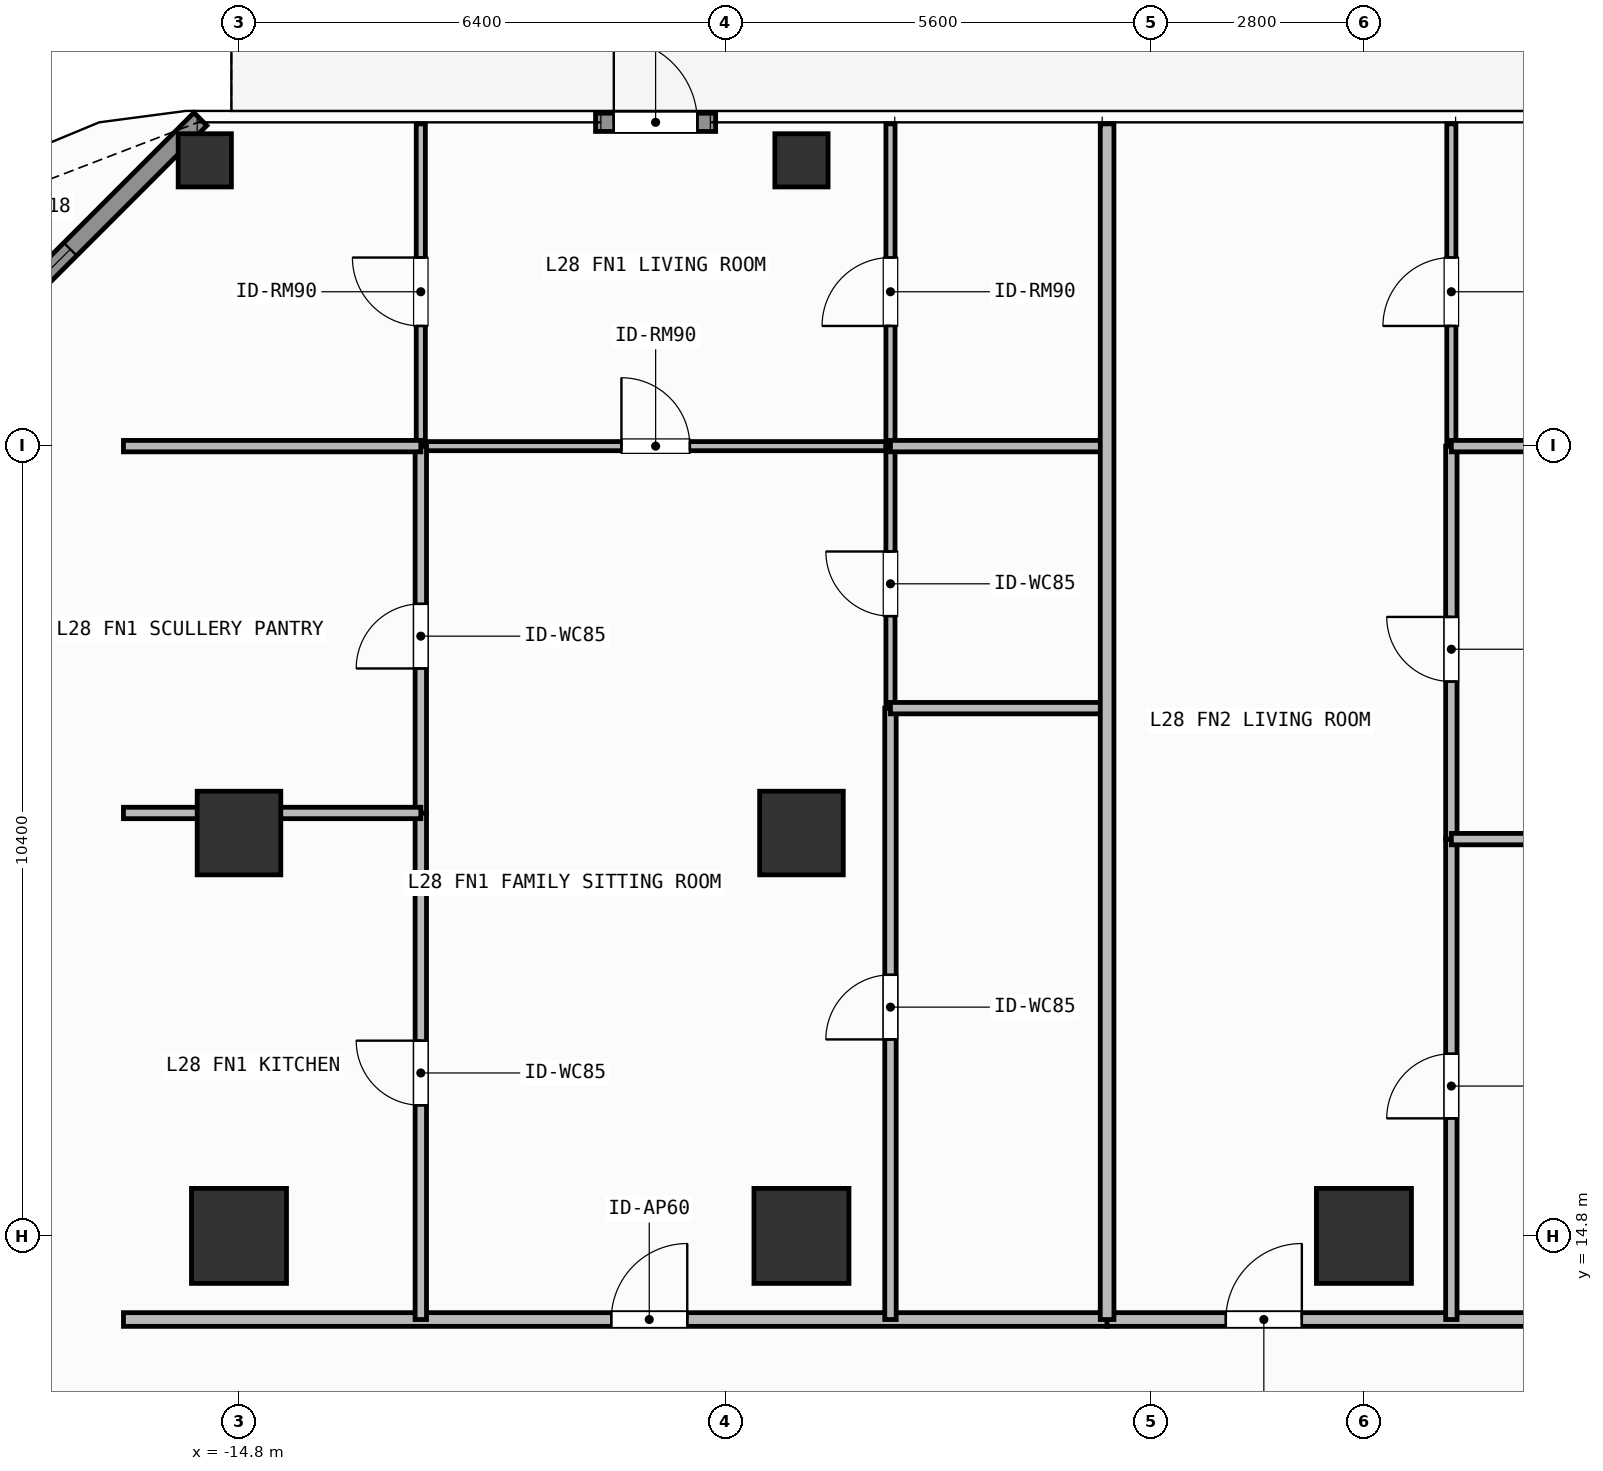
"""IFC4 building model, lengths in metres.
Left out: names, types, materials, properties, quantities, classifications, styles, units other than length and angle.
Written with IfcOpenShell. Run it as: python <this file> out.ifc"""

import sys

from ifc_helpers import new_model, si_unit, direction, frame, frame_2d, origin, origin_2d, place, context, subcontext, project, spatial, rectangle, hollow_rectangle, extrude, element, fill, save


model = new_model("IFC4")
c1 = context("Model", 3, precision=1e-05, world=origin(), true_north=direction((0.0, 1.0)))
c2 = subcontext(c1, "Body", "Model", "MODEL_VIEW")
j1 = project(units=[si_unit("LENGTHUNIT", "METRE"), si_unit("PLANEANGLEUNIT", "RADIAN")], contexts=[c1])
p1 = place(None, origin())
s1 = spatial("IfcSite", under=j1, at=p1, CompositionType="ELEMENT")
p2 = place(p1, origin())
s2 = spatial("IfcBuilding", under=s1, at=p2, CompositionType="ELEMENT")
p3 = place(p2, frame((0.0, 0.0, 113.4)))
s3 = spatial("IfcBuildingStorey", under=s2, at=p3, CompositionType="ELEMENT", Elevation=113.4)
for number, where, z_axis, x_axis in (
    (1, (-14.8, 14.8, 0.0), (0.0, 0.0, 1.0), (1.0, 0.0, 0.0)),
    (2, (-7.4, 14.8, 0.0), (0.0, 0.0, 1.0), (1.0, 0.0, 0.0)),
    (3, (0.0, 14.8, 0.0), (0.0, 0.0, 1.0), (1.0, 0.0, 0.0)),
):
    element("IfcColumn", number, at=place(p3, frame(where, z_axis=z_axis, x_axis=x_axis)), inside=s3, PredefinedType="COLUMN", context=c2, shape_type="SweptSolid", body=[
        extrude(rectangle(XDim=1.25, YDim=1.25, at=origin_2d()), origin(), (0.0, 0.0, 1.0), 3.9),
    ])
for number, where, z_axis, x_axis in (
    (4, (-14.8, 20.1, 0.0), (0.0, 0.0, 1.0), (1.0, 0.0, 0.0)),
    (5, (-7.4, 20.1, 0.0), (0.0, 0.0, 1.0), (1.0, 0.0, 0.0)),
):
    element("IfcColumn", number, at=place(p3, frame(where, z_axis=z_axis, x_axis=x_axis)), inside=s3, PredefinedType="COLUMN", context=c2, shape_type="SweptSolid", body=[
        extrude(rectangle(XDim=1.1, YDim=1.1, at=origin_2d()), origin(), (0.0, 0.0, 1.0), 3.9),
    ])
for number, where, z_axis, x_axis in (
    (6, (-15.25, 28.95, 0.0), (0.0, 0.0, 1.0), (1.0, 0.0, 0.0)),
    (7, (-7.4, 28.95, 0.0), (0.0, 0.0, 1.0), (1.0, 0.0, 0.0)),
):
    element("IfcColumn", number, at=place(p3, frame(where, z_axis=z_axis, x_axis=x_axis)), inside=s3, PredefinedType="COLUMN", context=c2, shape_type="SweptSolid", body=[
        extrude(hollow_rectangle(XDim=0.7, YDim=0.7, WallThickness=0.032, at=origin_2d()), origin(), (0.0, 0.0, 1.0), 3.9),
    ])
p4 = place(p3, frame((-10.109, 29.45, 0.0), z_axis=(0.0, 0.0, 1.0), x_axis=(1.0, 0.0, 0.0)))
e8 = element("IfcWall", 8, at=p4, inside=s3, PredefinedType="SOLIDWALL", context=c2, shape_type="SweptSolid", body=[
    extrude(rectangle(XDim=1.58, YDim=0.24, at=frame_2d((0.79, 0.0))), origin(), (0.0, 0.0, 1.0), 3.68),
])
p5 = place(p4, frame((0.24, 0.0, 0.0)))
e9 = element("IfcOpeningElement", 9, at=p5, cuts=e8, PredefinedType="OPENING", context=c2, shape_type="SweptSolid", body=[
    extrude(rectangle(XDim=1.1, YDim=2.2, at=frame_2d((0.55, 1.1))), frame((0.0, 0.13, 0.0), z_axis=(0.0, -1.0, 0.0), x_axis=(1.0, 0.0, 0.0)), (0.0, 0.0, 1.0), 0.26),
])
p6 = place(p3, frame((-19.792, 25.008, 0.0), z_axis=(0.0, 0.0, 1.0), x_axis=(0.707106781187, 0.707106781187, 0.0)))
e10 = element("IfcWall", 10, at=p6, inside=s3, PredefinedType="SOLIDWALL", context=c2, shape_type="SweptSolid", body=[
    extrude(rectangle(XDim=6.343, YDim=0.24, at=frame_2d((3.171, 0.0))), origin(), (0.0, 0.0, 1.0), 3.68),
])
p7 = place(p6, frame((2.421, 0.0, 0.8)))
e11 = element("IfcOpeningElement", 11, at=p7, cuts=e10, PredefinedType="OPENING", context=c2, shape_type="SweptSolid", body=[
    extrude(rectangle(XDim=1.5, YDim=1.85, at=frame_2d((0.75, 0.925))), frame((0.0, 0.13, 0.0), z_axis=(0.0, -1.0, 0.0), x_axis=(1.0, 0.0, 0.0)), (0.0, 0.0, 1.0), 0.26),
])
p8 = place(p3, frame((-16.32, 13.7, 0.0), z_axis=(0.0, 0.0, 1.0), x_axis=(1.0, 0.0, 0.0)))
e12 = element("IfcWall", 12, at=p8, inside=s3, PredefinedType="PARTITIONING", context=c2, shape_type="SweptSolid", body=[
    extrude(rectangle(XDim=12.941, YDim=0.18, at=frame_2d((6.471, 0.0))), origin(), (0.0, 0.0, 1.0), 3.68),
])
p9 = place(p8, frame((6.417, 0.0, 0.0)))
e13 = element("IfcOpeningElement", 13, at=p9, cuts=e12, PredefinedType="OPENING", context=c2, shape_type="SweptSolid", body=[
    extrude(rectangle(XDim=1.0, YDim=2.2, at=frame_2d((0.5, 1.1))), frame((0.0, 0.1, 0.0), z_axis=(0.0, -1.0, 0.0), x_axis=(1.0, 0.0, 0.0)), (0.0, 0.0, 1.0), 0.2),
])
p10 = place(p3, frame((-12.408, 25.19, 0.0), z_axis=(0.0, 0.0, 1.0), x_axis=(1.0, 0.0, 0.0)))
e14 = element("IfcWall", 14, at=p10, inside=s3, PredefinedType="PARTITIONING", context=c2, shape_type="SweptSolid", body=[
    extrude(rectangle(XDim=6.179, YDim=0.12, at=frame_2d((3.089, 0.0))), origin(), (0.0, 0.0, 1.0), 3.68),
])
p11 = place(p10, frame((2.639, 0.0, 0.0)))
e15 = element("IfcOpeningElement", 15, at=p11, cuts=e14, PredefinedType="OPENING", context=c2, shape_type="SweptSolid", body=[
    extrude(rectangle(XDim=0.9, YDim=2.1, at=frame_2d((0.45, 1.05))), frame((0.0, 0.07, 0.0), z_axis=(0.0, -1.0, 0.0), x_axis=(1.0, 0.0, 0.0)), (0.0, 0.0, 1.0), 0.14),
])
p12 = place(p3, frame((-12.408, 13.7, 0.0), z_axis=(0.0, 0.0, 1.0), x_axis=(0.0, 1.0, 0.0)))
e16 = element("IfcWall", 16, at=p12, inside=s3, PredefinedType="PARTITIONING", context=c2, shape_type="SweptSolid", body=[
    extrude(rectangle(XDim=6.664, YDim=0.15, at=frame_2d((3.332, 0.0))), origin(), (0.0, 0.0, 1.0), 3.68),
])
p13 = place(p12, frame((2.818, 0.0, 0.0)))
e17 = element("IfcOpeningElement", 17, at=p13, cuts=e16, PredefinedType="OPENING", context=c2, shape_type="SweptSolid", body=[
    extrude(rectangle(XDim=0.85, YDim=2.1, at=frame_2d((0.425, 1.05))), frame((0.0, 0.085, 0.0), z_axis=(0.0, -1.0, 0.0), x_axis=(1.0, 0.0, 0.0)), (0.0, 0.0, 1.0), 0.17),
])
p14 = place(p3, frame((-12.408, 20.364, 0.0), z_axis=(0.0, 0.0, 1.0), x_axis=(0.0, 1.0, 0.0)))
e18 = element("IfcWall", 18, at=p14, inside=s3, PredefinedType="PARTITIONING", context=c2, shape_type="SweptSolid", body=[
    extrude(rectangle(XDim=4.826, YDim=0.15, at=frame_2d((2.413, 0.0))), origin(), (0.0, 0.0, 1.0), 3.68),
])
p15 = place(p14, frame((1.901, 0.0, 0.0)))
e19 = element("IfcOpeningElement", 19, at=p15, cuts=e18, PredefinedType="OPENING", context=c2, shape_type="SweptSolid", body=[
    extrude(rectangle(XDim=0.85, YDim=2.1, at=frame_2d((0.425, 1.05))), frame((0.0, 0.085, 0.0), z_axis=(0.0, -1.0, 0.0), x_axis=(1.0, 0.0, 0.0)), (0.0, 0.0, 1.0), 0.17),
])
p16 = place(p3, frame((-12.408, 25.19, 0.0), z_axis=(0.0, 0.0, 1.0), x_axis=(0.0, 1.0, 0.0)))
e20 = element("IfcWall", 20, at=p16, inside=s3, PredefinedType="PARTITIONING", context=c2, shape_type="SweptSolid", body=[
    extrude(rectangle(XDim=4.24, YDim=0.12, at=frame_2d((2.12, 0.0))), origin(), (0.0, 0.0, 1.0), 3.68),
])
p17 = place(p16, frame((1.581, 0.0, 0.0)))
e21 = element("IfcOpeningElement", 21, at=p17, cuts=e20, PredefinedType="OPENING", context=c2, shape_type="SweptSolid", body=[
    extrude(rectangle(XDim=0.9, YDim=2.1, at=frame_2d((0.45, 1.05))), frame((0.0, 0.07, 0.0), z_axis=(0.0, -1.0, 0.0), x_axis=(1.0, 0.0, 0.0)), (0.0, 0.0, 1.0), 0.14),
])
p18 = place(p3, frame((-6.229, 13.7, 0.0), z_axis=(0.0, 0.0, 1.0), x_axis=(0.0, 1.0, 0.0)))
e22 = element("IfcWall", 22, at=p18, inside=s3, PredefinedType="PARTITIONING", context=c2, shape_type="SweptSolid", body=[
    extrude(rectangle(XDim=8.043, YDim=0.15, at=frame_2d((4.021, 0.0))), origin(), (0.0, 0.0, 1.0), 3.68),
])
p19 = place(p18, frame((3.685, 0.0, 0.0)))
e23 = element("IfcOpeningElement", 23, at=p19, cuts=e22, PredefinedType="OPENING", context=c2, shape_type="SweptSolid", body=[
    extrude(rectangle(XDim=0.85, YDim=2.1, at=frame_2d((0.425, 1.05))), frame((0.0, 0.085, 0.0), z_axis=(0.0, -1.0, 0.0), x_axis=(1.0, 0.0, 0.0)), (0.0, 0.0, 1.0), 0.17),
])
p20 = place(p3, frame((-6.229, 21.743, 0.0), z_axis=(0.0, 0.0, 1.0), x_axis=(0.0, 1.0, 0.0)))
e24 = element("IfcWall", 24, at=p20, inside=s3, PredefinedType="PARTITIONING", context=c2, shape_type="SweptSolid", body=[
    extrude(rectangle(XDim=3.447, YDim=0.12, at=frame_2d((1.724, 0.0))), origin(), (0.0, 0.0, 1.0), 3.68),
])
p21 = place(p20, frame((1.211, 0.0, 0.0)))
e25 = element("IfcOpeningElement", 25, at=p21, cuts=e24, PredefinedType="OPENING", context=c2, shape_type="SweptSolid", body=[
    extrude(rectangle(XDim=0.85, YDim=2.1, at=frame_2d((0.425, 1.05))), frame((0.0, 0.07, 0.0), z_axis=(0.0, -1.0, 0.0), x_axis=(1.0, 0.0, 0.0)), (0.0, 0.0, 1.0), 0.14),
])
p22 = place(p3, frame((-6.229, 25.19, 0.0), z_axis=(0.0, 0.0, 1.0), x_axis=(0.0, 1.0, 0.0)))
e26 = element("IfcWall", 26, at=p22, inside=s3, PredefinedType="PARTITIONING", context=c2, shape_type="SweptSolid", body=[
    extrude(rectangle(XDim=4.24, YDim=0.12, at=frame_2d((2.12, 0.0))), origin(), (0.0, 0.0, 1.0), 3.68),
])
p23 = place(p22, frame((1.581, 0.0, 0.0)))
e27 = element("IfcOpeningElement", 27, at=p23, cuts=e26, PredefinedType="OPENING", context=c2, shape_type="SweptSolid", body=[
    extrude(rectangle(XDim=0.9, YDim=2.1, at=frame_2d((0.45, 1.05))), frame((0.0, 0.07, 0.0), z_axis=(0.0, -1.0, 0.0), x_axis=(1.0, 0.0, 0.0)), (0.0, 0.0, 1.0), 0.14),
])
p24 = place(p3, frame((-3.379, 13.7, 0.0), z_axis=(0.0, 0.0, 1.0), x_axis=(1.0, 0.0, 0.0)))
e28 = element("IfcWall", 28, at=p24, inside=s3, PredefinedType="PARTITIONING", context=c2, shape_type="SweptSolid", body=[
    extrude(rectangle(XDim=7.279, YDim=0.18, at=frame_2d((3.639, 0.0))), origin(), (0.0, 0.0, 1.0), 3.68),
])
p25 = place(p24, frame((1.562, 0.0, 0.0)))
e29 = element("IfcOpeningElement", 29, at=p25, cuts=e28, PredefinedType="OPENING", context=c2, shape_type="SweptSolid", body=[
    extrude(rectangle(XDim=1.0, YDim=2.2, at=frame_2d((0.5, 1.1))), frame((0.0, 0.1, 0.0), z_axis=(0.0, -1.0, 0.0), x_axis=(1.0, 0.0, 0.0)), (0.0, 0.0, 1.0), 0.2),
])
p26 = place(p3, frame((1.15, 13.7, 0.0), z_axis=(0.0, 0.0, 1.0), x_axis=(0.0, 1.0, 0.0)))
e30 = element("IfcWall", 30, at=p26, inside=s3, PredefinedType="PARTITIONING", context=c2, shape_type="SweptSolid", body=[
    extrude(rectangle(XDim=6.32, YDim=0.15, at=frame_2d((3.16, 0.0))), origin(), (0.0, 0.0, 1.0), 3.68),
])
p27 = place(p26, frame((2.646, 0.0, 0.0)))
e31 = element("IfcOpeningElement", 31, at=p27, cuts=e30, PredefinedType="OPENING", context=c2, shape_type="SweptSolid", body=[
    extrude(rectangle(XDim=0.85, YDim=2.1, at=frame_2d((0.425, 1.05))), frame((0.0, 0.085, 0.0), z_axis=(0.0, -1.0, 0.0), x_axis=(1.0, 0.0, 0.0)), (0.0, 0.0, 1.0), 0.17),
])
p28 = place(p3, frame((1.15, 20.02, 0.0), z_axis=(0.0, 0.0, 1.0), x_axis=(0.0, 1.0, 0.0)))
e32 = element("IfcWall", 32, at=p28, inside=s3, PredefinedType="PARTITIONING", context=c2, shape_type="SweptSolid", body=[
    extrude(rectangle(XDim=5.17, YDim=0.15, at=frame_2d((2.585, 0.0))), origin(), (0.0, 0.0, 1.0), 3.68),
])
p29 = place(p28, frame((2.073, 0.0, 0.0)))
e33 = element("IfcOpeningElement", 33, at=p29, cuts=e32, PredefinedType="OPENING", context=c2, shape_type="SweptSolid", body=[
    extrude(rectangle(XDim=0.85, YDim=2.1, at=frame_2d((0.425, 1.05))), frame((0.0, 0.085, 0.0), z_axis=(0.0, -1.0, 0.0), x_axis=(1.0, 0.0, 0.0)), (0.0, 0.0, 1.0), 0.17),
])
p30 = place(p3, frame((1.15, 25.19, 0.0), z_axis=(0.0, 0.0, 1.0), x_axis=(0.0, 1.0, 0.0)))
e34 = element("IfcWall", 34, at=p30, inside=s3, PredefinedType="PARTITIONING", context=c2, shape_type="SweptSolid", body=[
    extrude(rectangle(XDim=4.24, YDim=0.12, at=frame_2d((2.12, 0.0))), origin(), (0.0, 0.0, 1.0), 3.68),
])
p31 = place(p30, frame((1.581, 0.0, 0.0)))
e35 = element("IfcOpeningElement", 35, at=p31, cuts=e34, PredefinedType="OPENING", context=c2, shape_type="SweptSolid", body=[
    extrude(rectangle(XDim=0.9, YDim=2.1, at=frame_2d((0.45, 1.05))), frame((0.0, 0.07, 0.0), z_axis=(0.0, -1.0, 0.0), x_axis=(1.0, 0.0, 0.0)), (0.0, 0.0, 1.0), 0.14),
])
p32 = place(p3, frame((-16.32, 20.364, 0.0), z_axis=(0.0, 0.0, 1.0), x_axis=(1.0, 0.0, 0.0)))
e36 = element("IfcWall", 36, at=p32, inside=s3, PredefinedType="PARTITIONING", context=c2, shape_type="SweptSolid", body=[
    extrude(rectangle(XDim=3.912, YDim=0.15, at=frame_2d((1.956, 0.0))), origin(), (0.0, 0.0, 1.0), 3.082),
])
p33 = place(p3, frame((-16.32, 25.19, 0.0), z_axis=(0.0, 0.0, 1.0), x_axis=(1.0, 0.0, 0.0)))
e37 = element("IfcWall", 37, at=p33, inside=s3, PredefinedType="PARTITIONING", context=c2, shape_type="SweptSolid", body=[
    extrude(rectangle(XDim=3.912, YDim=0.15, at=frame_2d((1.956, 0.0))), origin(), (0.0, 0.0, 1.0), 3.68),
])
for number, where, z_axis, x_axis in (
    (38, (-6.229, 21.743, 0.0), (0.0, 0.0, 1.0), (1.0, 0.0, 0.0)),
    (39, (-6.229, 25.19, 0.0), (0.0, 0.0, 1.0), (1.0, 0.0, 0.0)),
):
    element("IfcWall", number, at=place(p3, frame(where, z_axis=z_axis, x_axis=x_axis)), inside=s3, PredefinedType="PARTITIONING", context=c2, shape_type="SweptSolid", body=[
        extrude(rectangle(XDim=2.85, YDim=0.15, at=frame_2d((1.425, 0.0))), origin(), (0.0, 0.0, 1.0), 3.68),
    ])
p34 = place(p3, frame((1.15, 20.02, 0.0), z_axis=(0.0, 0.0, 1.0), x_axis=(1.0, 0.0, 0.0)))
e40 = element("IfcWall", 40, at=p34, inside=s3, PredefinedType="PARTITIONING", context=c2, shape_type="SweptSolid", body=[
    extrude(rectangle(XDim=2.75, YDim=0.15, at=frame_2d((1.375, 0.0))), origin(), (0.0, 0.0, 1.0), 3.082),
])
p35 = place(p3, frame((1.15, 25.19, 0.0), z_axis=(0.0, 0.0, 1.0), x_axis=(1.0, 0.0, 0.0)))
e41 = element("IfcWall", 41, at=p35, inside=s3, PredefinedType="PARTITIONING", context=c2, shape_type="SweptSolid", body=[
    extrude(rectangle(XDim=2.75, YDim=0.15, at=frame_2d((1.375, 0.0))), origin(), (0.0, 0.0, 1.0), 3.68),
])
p36 = place(p3, frame((-3.379, 13.7, 0.0), z_axis=(0.0, 0.0, 1.0), x_axis=(0.0, 1.0, 0.0)))
e42 = element("IfcWall", 42, at=p36, inside=s3, PredefinedType="PARTITIONING", context=c2, shape_type="SweptSolid", body=[
    extrude(rectangle(XDim=15.73, YDim=0.18, at=frame_2d((7.865, 0.0))), origin(), (0.0, 0.0, 1.0), 3.68),
])
p37 = place(p5, origin())
e43 = element("IfcDoor", 43, at=p37, inside=s3, OperationType="SINGLE_SWING_LEFT", PredefinedType="DOOR", context=c2, shape_type="SweptSolid", body=[
    extrude(rectangle(XDim=1.1, YDim=2.2, at=frame_2d((0.55, 1.1))), frame((0.0, 0.025, 0.0), z_axis=(0.0, -1.0, 0.0), x_axis=(1.0, 0.0, 0.0)), (0.0, 0.0, 1.0), 0.05),
])
fill(e9, e43)
p38 = place(p7, origin())
e44 = element("IfcWindow", 44, at=p38, inside=s3, PartitioningType="SINGLE_PANEL", PredefinedType="WINDOW", context=c2, shape_type="SweptSolid", body=[
    extrude(rectangle(XDim=1.5, YDim=1.85, at=frame_2d((0.75, 0.925))), frame((0.0, 0.03, 0.0), z_axis=(0.0, -1.0, 0.0), x_axis=(1.0, 0.0, 0.0)), (0.0, 0.0, 1.0), 0.06),
])
fill(e11, e44)
p39 = place(p9, origin())
e45 = element("IfcDoor", 45, at=p39, inside=s3, OperationType="SINGLE_SWING_RIGHT", PredefinedType="DOOR", context=c2, shape_type="SweptSolid", body=[
    extrude(rectangle(XDim=1.0, YDim=2.2, at=frame_2d((0.5, 1.1))), frame((0.0, 0.025, 0.0), z_axis=(0.0, -1.0, 0.0), x_axis=(1.0, 0.0, 0.0)), (0.0, 0.0, 1.0), 0.05),
])
fill(e13, e45)
p40 = place(p11, origin())
e46 = element("IfcDoor", 46, at=p40, inside=s3, OperationType="SINGLE_SWING_LEFT", PredefinedType="DOOR", context=c2, shape_type="SweptSolid", body=[
    extrude(rectangle(XDim=0.9, YDim=2.1, at=frame_2d((0.45, 1.05))), frame((0.0, 0.025, 0.0), z_axis=(0.0, -1.0, 0.0), x_axis=(1.0, 0.0, 0.0)), (0.0, 0.0, 1.0), 0.05),
])
fill(e15, e46)
p41 = place(p13, origin())
e47 = element("IfcDoor", 47, at=p41, inside=s3, OperationType="SINGLE_SWING_RIGHT", PredefinedType="DOOR", context=c2, shape_type="SweptSolid", body=[
    extrude(rectangle(XDim=0.85, YDim=2.1, at=frame_2d((0.425, 1.05))), frame((0.0, 0.025, 0.0), z_axis=(0.0, -1.0, 0.0), x_axis=(1.0, 0.0, 0.0)), (0.0, 0.0, 1.0), 0.05),
])
fill(e17, e47)
p42 = place(p15, origin())
e48 = element("IfcDoor", 48, at=p42, inside=s3, OperationType="SINGLE_SWING_LEFT", PredefinedType="DOOR", context=c2, shape_type="SweptSolid", body=[
    extrude(rectangle(XDim=0.85, YDim=2.1, at=frame_2d((0.425, 1.05))), frame((0.0, 0.025, 0.0), z_axis=(0.0, -1.0, 0.0), x_axis=(1.0, 0.0, 0.0)), (0.0, 0.0, 1.0), 0.05),
])
fill(e19, e48)
p43 = place(p17, origin())
e49 = element("IfcDoor", 49, at=p43, inside=s3, OperationType="SINGLE_SWING_RIGHT", PredefinedType="DOOR", context=c2, shape_type="SweptSolid", body=[
    extrude(rectangle(XDim=0.9, YDim=2.1, at=frame_2d((0.45, 1.05))), frame((0.0, 0.025, 0.0), z_axis=(0.0, -1.0, 0.0), x_axis=(1.0, 0.0, 0.0)), (0.0, 0.0, 1.0), 0.05),
])
fill(e21, e49)
p44 = place(p19, origin())
e50 = element("IfcDoor", 50, at=p44, inside=s3, OperationType="SINGLE_SWING_LEFT", PredefinedType="DOOR", context=c2, shape_type="SweptSolid", body=[
    extrude(rectangle(XDim=0.85, YDim=2.1, at=frame_2d((0.425, 1.05))), frame((0.0, 0.025, 0.0), z_axis=(0.0, -1.0, 0.0), x_axis=(1.0, 0.0, 0.0)), (0.0, 0.0, 1.0), 0.05),
])
fill(e23, e50)
p45 = place(p21, origin())
e51 = element("IfcDoor", 51, at=p45, inside=s3, OperationType="SINGLE_SWING_RIGHT", PredefinedType="DOOR", context=c2, shape_type="SweptSolid", body=[
    extrude(rectangle(XDim=0.85, YDim=2.1, at=frame_2d((0.425, 1.05))), frame((0.0, 0.025, 0.0), z_axis=(0.0, -1.0, 0.0), x_axis=(1.0, 0.0, 0.0)), (0.0, 0.0, 1.0), 0.05),
])
fill(e25, e51)
p46 = place(p23, origin())
e52 = element("IfcDoor", 52, at=p46, inside=s3, OperationType="SINGLE_SWING_LEFT", PredefinedType="DOOR", context=c2, shape_type="SweptSolid", body=[
    extrude(rectangle(XDim=0.9, YDim=2.1, at=frame_2d((0.45, 1.05))), frame((0.0, 0.025, 0.0), z_axis=(0.0, -1.0, 0.0), x_axis=(1.0, 0.0, 0.0)), (0.0, 0.0, 1.0), 0.05),
])
fill(e27, e52)
p47 = place(p25, origin())
e53 = element("IfcDoor", 53, at=p47, inside=s3, OperationType="SINGLE_SWING_RIGHT", PredefinedType="DOOR", context=c2, shape_type="SweptSolid", body=[
    extrude(rectangle(XDim=1.0, YDim=2.2, at=frame_2d((0.5, 1.1))), frame((0.0, 0.025, 0.0), z_axis=(0.0, -1.0, 0.0), x_axis=(1.0, 0.0, 0.0)), (0.0, 0.0, 1.0), 0.05),
])
fill(e29, e53)
p48 = place(p27, origin())
e54 = element("IfcDoor", 54, at=p48, inside=s3, OperationType="SINGLE_SWING_LEFT", PredefinedType="DOOR", context=c2, shape_type="SweptSolid", body=[
    extrude(rectangle(XDim=0.85, YDim=2.1, at=frame_2d((0.425, 1.05))), frame((0.0, 0.025, 0.0), z_axis=(0.0, -1.0, 0.0), x_axis=(1.0, 0.0, 0.0)), (0.0, 0.0, 1.0), 0.05),
])
fill(e31, e54)
p49 = place(p29, origin())
e55 = element("IfcDoor", 55, at=p49, inside=s3, OperationType="SINGLE_SWING_RIGHT", PredefinedType="DOOR", context=c2, shape_type="SweptSolid", body=[
    extrude(rectangle(XDim=0.85, YDim=2.1, at=frame_2d((0.425, 1.05))), frame((0.0, 0.025, 0.0), z_axis=(0.0, -1.0, 0.0), x_axis=(1.0, 0.0, 0.0)), (0.0, 0.0, 1.0), 0.05),
])
fill(e33, e55)
p50 = place(p31, origin())
e56 = element("IfcDoor", 56, at=p50, inside=s3, OperationType="SINGLE_SWING_LEFT", PredefinedType="DOOR", context=c2, shape_type="SweptSolid", body=[
    extrude(rectangle(XDim=0.9, YDim=2.1, at=frame_2d((0.45, 1.05))), frame((0.0, 0.025, 0.0), z_axis=(0.0, -1.0, 0.0), x_axis=(1.0, 0.0, 0.0)), (0.0, 0.0, 1.0), 0.05),
])
fill(e35, e56)
save(model, sys.argv[1])
